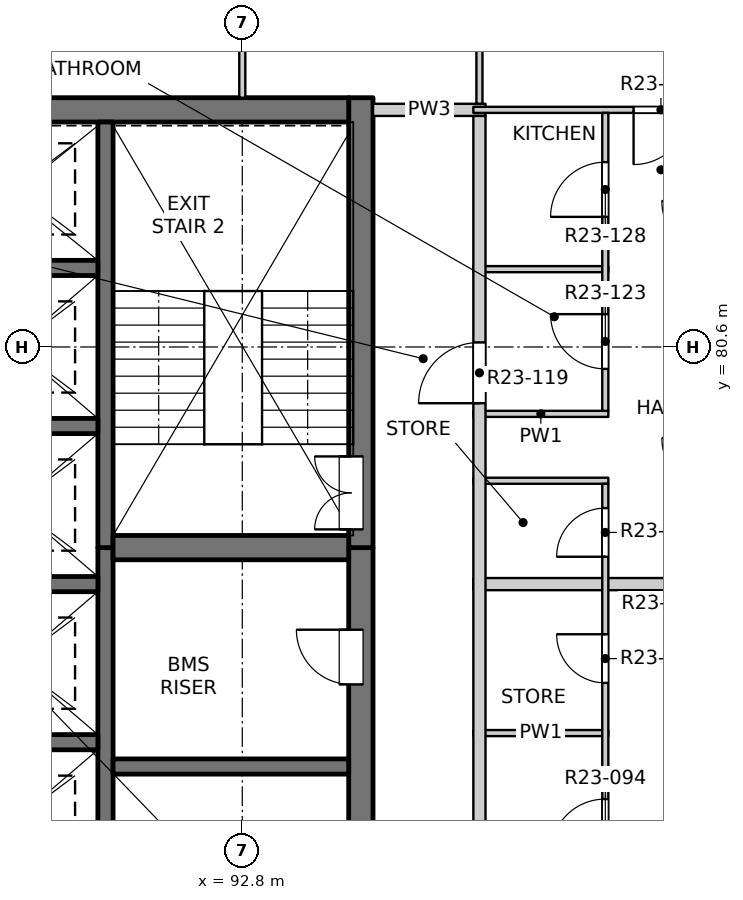
"""IFC4 building model, lengths in metres.
Left out: names, types, materials, properties, quantities, classifications, styles, units other than length and angle.
Written with IfcOpenShell. Run it as: python <this file> out.ifc"""

import sys

from ifc_helpers import new_model, si_unit, direction, frame, frame_2d, origin, place, context, subcontext, project, spatial, rectangle, extrude, element, fill, save


model = new_model("IFC4")
c1 = context("Model", 3, precision=1e-05, world=origin(), true_north=direction((0.0, 1.0)))
c2 = subcontext(c1, "Body", "Model", "MODEL_VIEW")
j1 = project(units=[si_unit("LENGTHUNIT", "METRE"), si_unit("PLANEANGLEUNIT", "RADIAN")], contexts=[c1])
p1 = place(None, origin())
s1 = spatial("IfcSite", under=j1, at=p1, CompositionType="ELEMENT")
p2 = place(p1, origin())
s2 = spatial("IfcBuilding", under=s1, at=p2, CompositionType="ELEMENT")
p3 = place(p2, frame((0.0, 0.0, 234.7)))
s3 = spatial("IfcBuildingStorey", under=s2, at=p3, CompositionType="ELEMENT", Elevation=234.7)
p4 = place(p3, frame((94.75, 61.95, -0.25), z_axis=(0.0, 0.0, 1.0), x_axis=(0.0, 1.0, 0.0)))
e1 = element("IfcWall", 1, at=p4, inside=s3, PredefinedType="SOLIDWALL", context=c2, shape_type="SweptSolid", body=[
    extrude(rectangle(XDim=15.35, YDim=0.4, at=frame_2d((7.675, 0.0))), origin(), (0.0, 0.0, 1.0), 3.4),
])
p5 = place(p4, frame((0.925, 0.0, 0.25)))
e2 = element("IfcOpeningElement", 2, at=p5, cuts=e1, PredefinedType="OPENING", context=c2, shape_type="SweptSolid", body=[
    extrude(rectangle(XDim=0.9, YDim=2.1, at=frame_2d((0.45, 1.05))), frame((0.0, 0.21, 0.0), z_axis=(0.0, -1.0, 0.0), x_axis=(1.0, 0.0, 0.0)), (0.0, 0.0, 1.0), 0.42),
])
p6 = place(p4, frame((6.8, 0.0, 0.25)))
e3 = element("IfcOpeningElement", 3, at=p6, cuts=e1, PredefinedType="OPENING", context=c2, shape_type="SweptSolid", body=[
    extrude(rectangle(XDim=0.9, YDim=2.1, at=frame_2d((0.45, 1.05))), frame((0.0, 0.21, 0.0), z_axis=(0.0, -1.0, 0.0), x_axis=(1.0, 0.0, 0.0)), (0.0, 0.0, 1.0), 0.42),
])
p7 = place(p4, frame((13.1, 0.0, 0.25)))
e4 = element("IfcOpeningElement", 4, at=p7, cuts=e1, PredefinedType="OPENING", context=c2, shape_type="SweptSolid", body=[
    extrude(rectangle(XDim=0.9, YDim=2.1, at=frame_2d((0.45, 1.05))), frame((0.0, 0.21, 0.0), z_axis=(0.0, -1.0, 0.0), x_axis=(1.0, 0.0, 0.0)), (0.0, 0.0, 1.0), 0.42),
])
p8 = place(p3, frame((94.75, 77.3, -0.25), z_axis=(0.0, 0.0, 1.0), x_axis=(0.0, 1.0, 0.0)))
e5 = element("IfcWall", 5, at=p8, inside=s3, PredefinedType="SOLIDWALL", context=c2, shape_type="SweptSolid", body=[
    extrude(rectangle(XDim=7.4, YDim=0.4, at=frame_2d((3.7, 0.0))), origin(), (0.0, 0.0, 1.0), 3.4),
])
p9 = place(p8, frame((0.3, 0.0, 0.25)))
e6 = element("IfcOpeningElement", 6, at=p9, cuts=e5, PredefinedType="OPENING", context=c2, shape_type="SweptSolid", body=[
    extrude(rectangle(XDim=1.2, YDim=2.1, at=frame_2d((0.6, 1.05))), frame((0.0, 0.21, 0.0), z_axis=(0.0, -1.0, 0.0), x_axis=(1.0, 0.0, 0.0)), (0.0, 0.0, 1.0), 0.42),
])
p10 = place(p3, frame((75.45, 84.5, -0.25), z_axis=(0.0, 0.0, 1.0), x_axis=(1.0, 0.0, 0.0)))
e7 = element("IfcWall", 7, at=p10, inside=s3, PredefinedType="SOLIDWALL", context=c2, shape_type="SweptSolid", body=[
    extrude(rectangle(XDim=19.1, YDim=0.4, at=frame_2d((9.55, 0.0))), origin(), (0.0, 0.0, 1.0), 3.4),
])
p11 = place(p3, frame((90.55, 61.95, -0.25), z_axis=(0.0, 0.0, 1.0), x_axis=(0.0, 1.0, 0.0)))
e8 = element("IfcWall", 8, at=p11, inside=s3, PredefinedType="SOLIDWALL", context=c2, shape_type="SweptSolid", body=[
    extrude(rectangle(XDim=15.35, YDim=0.25, at=frame_2d((7.675, 0.0))), origin(), (0.0, 0.0, 1.0), 3.4),
])
p12 = place(p3, frame((90.55, 77.3, -0.25), z_axis=(0.0, 0.0, 1.0), x_axis=(0.0, 1.0, 0.0)))
e9 = element("IfcWall", 9, at=p12, inside=s3, PredefinedType="SOLIDWALL", context=c2, shape_type="SweptSolid", body=[
    extrude(rectangle(XDim=7.0, YDim=0.25, at=frame_2d((3.5, 0.0))), origin(), (0.0, 0.0, 1.0), 3.4),
])
for number, where, z_axis, x_axis in (
    (10, (87.425, 74.1, -0.25), (0.0, 0.0, 1.0), (1.0, 0.0, 0.0)),
    (11, (87.425, 76.7, -0.25), (0.0, 0.0, 1.0), (1.0, 0.0, 0.0)),
    (12, (87.425, 79.3, -0.25), (0.0, 0.0, 1.0), (1.0, 0.0, 0.0)),
    (13, (87.425, 81.9, -0.25), (0.0, 0.0, 1.0), (1.0, 0.0, 0.0)),
):
    element("IfcWall", number, at=place(p3, frame(where, z_axis=z_axis, x_axis=x_axis)), inside=s3, PredefinedType="SOLIDWALL", context=c2, shape_type="SweptSolid", body=[
        extrude(rectangle(XDim=3.0, YDim=0.25, at=frame_2d((1.5, 0.0))), origin(), (0.0, 0.0, 1.0), 3.4),
    ])
p13 = place(p3, frame((90.675, 73.7, -0.25), z_axis=(0.0, 0.0, 1.0), x_axis=(1.0, 0.0, 0.0)))
e14 = element("IfcWall", 14, at=p13, inside=s3, PredefinedType="SOLIDWALL", context=c2, shape_type="SweptSolid", body=[
    extrude(rectangle(XDim=3.875, YDim=0.25, at=frame_2d((1.938, 0.0))), origin(), (0.0, 0.0, 1.0), 3.4),
])
p14 = place(p3, frame((90.675, 77.3, -0.25), z_axis=(0.0, 0.0, 1.0), x_axis=(1.0, 0.0, 0.0)))
e15 = element("IfcWall", 15, at=p14, inside=s3, PredefinedType="SOLIDWALL", context=c2, shape_type="SweptSolid", body=[
    extrude(rectangle(XDim=3.875, YDim=0.4, at=frame_2d((1.938, 0.0))), origin(), (0.0, 0.0, 1.0), 3.4),
])
p15 = place(p3, frame((96.6, 74.25, 0.0), z_axis=(0.0, 0.0, 1.0), x_axis=(1.0, 0.0, 0.0)))
e16 = element("IfcWall", 16, at=p15, inside=s3, PredefinedType="PARTITIONING", context=c2, shape_type="SweptSolid", body=[
    extrude(rectangle(XDim=2.22, YDim=0.1, at=frame_2d((1.11, 0.0))), origin(), (0.0, 0.0, 1.0), 3.15),
])
p16 = place(p3, frame((96.6, 76.7, 0.0), z_axis=(0.0, 0.0, 1.0), x_axis=(1.0, 0.0, 0.0)))
e17 = element("IfcWall", 17, at=p16, inside=s3, PredefinedType="PARTITIONING", context=c2, shape_type="SweptSolid", body=[
    extrude(rectangle(XDim=11.5, YDim=0.2, at=frame_2d((5.75, 0.0))), origin(), (0.0, 0.0, 1.0), 2.55),
])
for number, where, z_axis, x_axis in (
    (18, (96.6, 78.4, 0.0), (0.0, 0.0, 1.0), (1.0, 0.0, 0.0)),
    (19, (96.6, 79.5, 0.0), (0.0, 0.0, 1.0), (1.0, 0.0, 0.0)),
    (20, (96.6, 81.88, 0.0), (0.0, 0.0, 1.0), (1.0, 0.0, 0.0)),
):
    element("IfcWall", number, at=place(p3, frame(where, z_axis=z_axis, x_axis=x_axis)), inside=s3, PredefinedType="PARTITIONING", context=c2, shape_type="SweptSolid", body=[
        extrude(rectangle(XDim=2.22, YDim=0.1, at=frame_2d((1.11, 0.0))), origin(), (0.0, 0.0, 1.0), 3.15),
    ])
p17 = place(p3, frame((94.95, 84.5, 0.0), z_axis=(0.0, 0.0, 1.0), x_axis=(1.0, 0.0, 0.0)))
e21 = element("IfcWall", 21, at=p17, inside=s3, PredefinedType="PARTITIONING", context=c2, shape_type="SweptSolid", body=[
    extrude(rectangle(XDim=1.85, YDim=0.2, at=frame_2d((0.925, 0.0))), origin(), (0.0, 0.0, 1.0), 3.15),
])
p18 = place(p3, frame((96.6, 84.5, 0.0), z_axis=(0.0, 0.0, 1.0), x_axis=(1.0, 0.0, 0.0)))
e22 = element("IfcWall", 22, at=p18, inside=s3, PredefinedType="PARTITIONING", context=c2, shape_type="SweptSolid", body=[
    extrude(rectangle(XDim=11.5, YDim=0.1, at=frame_2d((5.75, 0.0))), origin(), (0.0, 0.0, 1.0), 3.15),
])
p19 = place(p18, frame((2.635, 0.0, 0.0)))
e23 = element("IfcOpeningElement", 23, at=p19, cuts=e22, PredefinedType="OPENING", context=c2, shape_type="SweptSolid", body=[
    extrude(rectangle(XDim=0.9, YDim=2.1, at=frame_2d((0.45, 1.05))), frame((0.0, 0.06, 0.0), z_axis=(0.0, -1.0, 0.0), x_axis=(1.0, 0.0, 0.0)), (0.0, 0.0, 1.0), 0.12),
])
p20 = place(p3, frame((92.8, 84.7, 0.0), z_axis=(0.0, 0.0, 1.0), x_axis=(0.0, 1.0, 0.0)))
e24 = element("IfcWall", 24, at=p20, inside=s3, PredefinedType="PARTITIONING", context=c2, shape_type="SweptSolid", body=[
    extrude(rectangle(XDim=3.4, YDim=0.1, at=frame_2d((1.7, 0.0))), origin(), (0.0, 0.0, 1.0), 3.15),
])
p21 = place(p20, frame((1.3, 0.0, 0.0)))
e25 = element("IfcOpeningElement", 25, at=p21, cuts=e24, PredefinedType="OPENING", context=c2, shape_type="SweptSolid", body=[
    extrude(rectangle(XDim=0.9, YDim=2.1, at=frame_2d((0.45, 1.05))), frame((0.0, 0.06, 0.0), z_axis=(0.0, -1.0, 0.0), x_axis=(1.0, 0.0, 0.0)), (0.0, 0.0, 1.0), 0.12),
])
p22 = place(p3, frame((96.7, 49.5, 0.0), z_axis=(0.0, 0.0, 1.0), x_axis=(0.0, 1.0, 0.0)))
e26 = element("IfcWall", 26, at=p22, inside=s3, PredefinedType="PARTITIONING", context=c2, shape_type="SweptSolid", body=[
    extrude(rectangle(XDim=34.9, YDim=0.2, at=frame_2d((17.45, 0.0))), origin(), (0.0, 0.0, 1.0), 3.15),
])
p23 = place(p22, frame((3.175, 0.0, 0.0)))
e27 = element("IfcOpeningElement", 27, at=p23, cuts=e26, PredefinedType="OPENING", context=c2, shape_type="SweptSolid", body=[
    extrude(rectangle(XDim=1.0, YDim=2.1, at=frame_2d((0.5, 1.05))), frame((0.0, 0.11, 0.0), z_axis=(0.0, -1.0, 0.0), x_axis=(1.0, 0.0, 0.0)), (0.0, 0.0, 1.0), 0.22),
])
p24 = place(p22, frame((14.625, 0.0, 0.0)))
e28 = element("IfcOpeningElement", 28, at=p24, cuts=e26, PredefinedType="OPENING", context=c2, shape_type="SweptSolid", body=[
    extrude(rectangle(XDim=1.0, YDim=2.1, at=frame_2d((0.5, 1.05))), frame((0.0, 0.11, 0.0), z_axis=(0.0, -1.0, 0.0), x_axis=(1.0, 0.0, 0.0)), (0.0, 0.0, 1.0), 0.22),
])
p25 = place(p22, frame((30.175, 0.0, 0.0)))
e29 = element("IfcOpeningElement", 29, at=p25, cuts=e26, PredefinedType="OPENING", context=c2, shape_type="SweptSolid", body=[
    extrude(rectangle(XDim=1.0, YDim=2.1, at=frame_2d((0.5, 1.05))), frame((0.0, 0.11, 0.0), z_axis=(0.0, -1.0, 0.0), x_axis=(1.0, 0.0, 0.0)), (0.0, 0.0, 1.0), 0.22),
])
p26 = place(p3, frame((96.7, 84.6, 0.0), z_axis=(0.0, 0.0, 1.0), x_axis=(0.0, 1.0, 0.0)))
e30 = element("IfcWall", 30, at=p26, inside=s3, PredefinedType="PARTITIONING", context=c2, shape_type="SweptSolid", body=[
    extrude(rectangle(XDim=3.5, YDim=0.1, at=frame_2d((1.75, 0.0))), origin(), (0.0, 0.0, 1.0), 3.15),
])
p27 = place(p26, frame((1.4, 0.0, 0.0)))
e31 = element("IfcOpeningElement", 31, at=p27, cuts=e30, PredefinedType="OPENING", context=c2, shape_type="SweptSolid", body=[
    extrude(rectangle(XDim=0.9, YDim=2.1, at=frame_2d((0.45, 1.05))), frame((0.0, 0.06, 0.0), z_axis=(0.0, -1.0, 0.0), x_axis=(1.0, 0.0, 0.0)), (0.0, 0.0, 1.0), 0.12),
])
p28 = place(p3, frame((98.77, 64.0, 0.0), z_axis=(0.0, 0.0, 1.0), x_axis=(0.0, 1.0, 0.0)))
e32 = element("IfcWall", 32, at=p28, inside=s3, PredefinedType="PARTITIONING", context=c2, shape_type="SweptSolid", body=[
    extrude(rectangle(XDim=14.35, YDim=0.1, at=frame_2d((7.175, 0.0))), origin(), (0.0, 0.0, 1.0), 3.15),
])
p29 = place(p28, frame((0.815, 0.0, 0.0)))
e33 = element("IfcOpeningElement", 33, at=p29, cuts=e32, PredefinedType="OPENING", context=c2, shape_type="SweptSolid", body=[
    extrude(rectangle(XDim=0.8, YDim=2.1, at=frame_2d((0.4, 1.05))), frame((0.0, 0.06, 0.0), z_axis=(0.0, -1.0, 0.0), x_axis=(1.0, 0.0, 0.0)), (0.0, 0.0, 1.0), 0.12),
])
p30 = place(p28, frame((3.23, 0.0, 0.0)))
e34 = element("IfcOpeningElement", 34, at=p30, cuts=e32, PredefinedType="OPENING", context=c2, shape_type="SweptSolid", body=[
    extrude(rectangle(XDim=0.9, YDim=2.1, at=frame_2d((0.45, 1.05))), frame((0.0, 0.06, 0.0), z_axis=(0.0, -1.0, 0.0), x_axis=(1.0, 0.0, 0.0)), (0.0, 0.0, 1.0), 0.12),
])
p31 = place(p28, frame((5.63, 0.0, 0.0)))
e35 = element("IfcOpeningElement", 35, at=p31, cuts=e32, PredefinedType="OPENING", context=c2, shape_type="SweptSolid", body=[
    extrude(rectangle(XDim=0.8, YDim=2.1, at=frame_2d((0.4, 1.05))), frame((0.0, 0.06, 0.0), z_axis=(0.0, -1.0, 0.0), x_axis=(1.0, 0.0, 0.0)), (0.0, 0.0, 1.0), 0.12),
])
p32 = place(p28, frame((8.265, 0.0, 0.0)))
e36 = element("IfcOpeningElement", 36, at=p32, cuts=e32, PredefinedType="OPENING", context=c2, shape_type="SweptSolid", body=[
    extrude(rectangle(XDim=0.9, YDim=2.1, at=frame_2d((0.45, 1.05))), frame((0.0, 0.06, 0.0), z_axis=(0.0, -1.0, 0.0), x_axis=(1.0, 0.0, 0.0)), (0.0, 0.0, 1.0), 0.12),
])
p33 = place(p28, frame((11.075, 0.0, 0.0)))
e37 = element("IfcOpeningElement", 37, at=p33, cuts=e32, PredefinedType="OPENING", context=c2, shape_type="SweptSolid", body=[
    extrude(rectangle(XDim=0.8, YDim=2.1, at=frame_2d((0.4, 1.05))), frame((0.0, 0.06, 0.0), z_axis=(0.0, -1.0, 0.0), x_axis=(1.0, 0.0, 0.0)), (0.0, 0.0, 1.0), 0.12),
])
p34 = place(p28, frame((13.15, 0.0, 0.0)))
e38 = element("IfcOpeningElement", 38, at=p34, cuts=e32, PredefinedType="OPENING", context=c2, shape_type="SweptSolid", body=[
    extrude(rectangle(XDim=0.8, YDim=2.1, at=frame_2d((0.4, 1.05))), frame((0.0, 0.06, 0.0), z_axis=(0.0, -1.0, 0.0), x_axis=(1.0, 0.0, 0.0)), (0.0, 0.0, 1.0), 0.12),
])
p35 = place(p3, frame((98.77, 79.55, 0.0), z_axis=(0.0, 0.0, 1.0), x_axis=(0.0, 1.0, 0.0)))
e39 = element("IfcWall", 39, at=p35, inside=s3, PredefinedType="PARTITIONING", context=c2, shape_type="SweptSolid", body=[
    extrude(rectangle(XDim=4.9, YDim=0.1, at=frame_2d((2.45, 0.0))), origin(), (0.0, 0.0, 1.0), 3.15),
])
p36 = place(p35, frame((0.69, 0.0, 0.0)))
e40 = element("IfcOpeningElement", 40, at=p36, cuts=e39, PredefinedType="OPENING", context=c2, shape_type="SweptSolid", body=[
    extrude(rectangle(XDim=0.9, YDim=2.1, at=frame_2d((0.45, 1.05))), frame((0.0, 0.06, 0.0), z_axis=(0.0, -1.0, 0.0), x_axis=(1.0, 0.0, 0.0)), (0.0, 0.0, 1.0), 0.12),
])
p37 = place(p35, frame((3.19, 0.0, 0.0)))
e41 = element("IfcOpeningElement", 41, at=p37, cuts=e39, PredefinedType="OPENING", context=c2, shape_type="SweptSolid", body=[
    extrude(rectangle(XDim=0.9, YDim=2.1, at=frame_2d((0.45, 1.05))), frame((0.0, 0.06, 0.0), z_axis=(0.0, -1.0, 0.0), x_axis=(1.0, 0.0, 0.0)), (0.0, 0.0, 1.0), 0.12),
])
p38 = place(p32, origin())
e42 = element("IfcDoor", 42, at=p38, inside=s3, OperationType="SINGLE_SWING_LEFT", PredefinedType="DOOR", context=c2, shape_type="SweptSolid", body=[
    extrude(rectangle(XDim=0.9, YDim=2.1, at=frame_2d((0.45, 1.05))), frame((0.0, 0.025, 0.0), z_axis=(0.0, -1.0, 0.0), x_axis=(1.0, 0.0, 0.0)), (0.0, 0.0, 1.0), 0.05),
])
fill(e36, e42)
p39 = place(p33, origin())
e43 = element("IfcDoor", 43, at=p39, inside=s3, OperationType="SINGLE_SWING_RIGHT", PredefinedType="DOOR", context=c2, shape_type="SweptSolid", body=[
    extrude(rectangle(XDim=0.8, YDim=2.1, at=frame_2d((0.4, 1.05))), frame((0.0, 0.025, 0.0), z_axis=(0.0, -1.0, 0.0), x_axis=(1.0, 0.0, 0.0)), (0.0, 0.0, 1.0), 0.05),
])
fill(e37, e43)
p40 = place(p7, origin())
e44 = element("IfcDoor", 44, at=p40, inside=s3, OperationType="SINGLE_SWING_RIGHT", PredefinedType="DOOR", context=c2, shape_type="SweptSolid", body=[
    extrude(rectangle(XDim=0.9, YDim=2.1, at=frame_2d((0.45, 1.05))), frame((0.0, 0.185, 0.0), z_axis=(0.0, -1.0, 0.0), x_axis=(1.0, 0.0, 0.0)), (0.0, 0.0, 1.0), 0.05),
])
fill(e4, e44)
p41 = place(p34, origin())
e45 = element("IfcDoor", 45, at=p41, inside=s3, OperationType="SINGLE_SWING_LEFT", PredefinedType="DOOR", context=c2, shape_type="SweptSolid", body=[
    extrude(rectangle(XDim=0.8, YDim=2.1, at=frame_2d((0.4, 1.05))), frame((0.0, 0.025, 0.0), z_axis=(0.0, -1.0, 0.0), x_axis=(1.0, 0.0, 0.0)), (0.0, 0.0, 1.0), 0.05),
])
fill(e38, e45)
p42 = place(p9, origin())
e46 = element("IfcDoor", 46, at=p42, inside=s3, OperationType="DOUBLE_DOOR_SINGLE_SWING", PredefinedType="DOOR", context=c2, shape_type="SweptSolid", body=[
    extrude(rectangle(XDim=1.2, YDim=2.1, at=frame_2d((0.6, 1.05))), frame((0.0, 0.185, 0.0), z_axis=(0.0, -1.0, 0.0), x_axis=(1.0, 0.0, 0.0)), (0.0, 0.0, 1.0), 0.05),
])
fill(e6, e46)
p43 = place(p25, origin())
e47 = element("IfcDoor", 47, at=p43, inside=s3, OperationType="SINGLE_SWING_LEFT", PredefinedType="DOOR", context=c2, shape_type="SweptSolid", body=[
    extrude(rectangle(XDim=1.0, YDim=2.1, at=frame_2d((0.5, 1.05))), frame((0.0, 0.025, 0.0), z_axis=(0.0, -1.0, 0.0), x_axis=(1.0, 0.0, 0.0)), (0.0, 0.0, 1.0), 0.05),
])
fill(e29, e47)
p44 = place(p36, origin())
e48 = element("IfcDoor", 48, at=p44, inside=s3, OperationType="SINGLE_SWING_RIGHT", PredefinedType="DOOR", context=c2, shape_type="SweptSolid", body=[
    extrude(rectangle(XDim=0.9, YDim=2.1, at=frame_2d((0.45, 1.05))), frame((0.0, 0.025, 0.0), z_axis=(0.0, -1.0, 0.0), x_axis=(1.0, 0.0, 0.0)), (0.0, 0.0, 1.0), 0.05),
])
fill(e40, e48)
p45 = place(p37, origin())
e49 = element("IfcDoor", 49, at=p45, inside=s3, OperationType="SINGLE_SWING_LEFT", PredefinedType="DOOR", context=c2, shape_type="SweptSolid", body=[
    extrude(rectangle(XDim=0.9, YDim=2.1, at=frame_2d((0.45, 1.05))), frame((0.0, 0.025, 0.0), z_axis=(0.0, -1.0, 0.0), x_axis=(1.0, 0.0, 0.0)), (0.0, 0.0, 1.0), 0.05),
])
fill(e41, e49)
p46 = place(p19, origin())
e50 = element("IfcDoor", 50, at=p46, inside=s3, OperationType="SINGLE_SWING_RIGHT", PredefinedType="DOOR", context=c2, shape_type="SweptSolid", body=[
    extrude(rectangle(XDim=0.9, YDim=2.1, at=frame_2d((0.45, 1.05))), frame((0.0, 0.025, 0.0), z_axis=(0.0, -1.0, 0.0), x_axis=(1.0, 0.0, 0.0)), (0.0, 0.0, 1.0), 0.05),
])
fill(e23, e50)
save(model, sys.argv[1])
